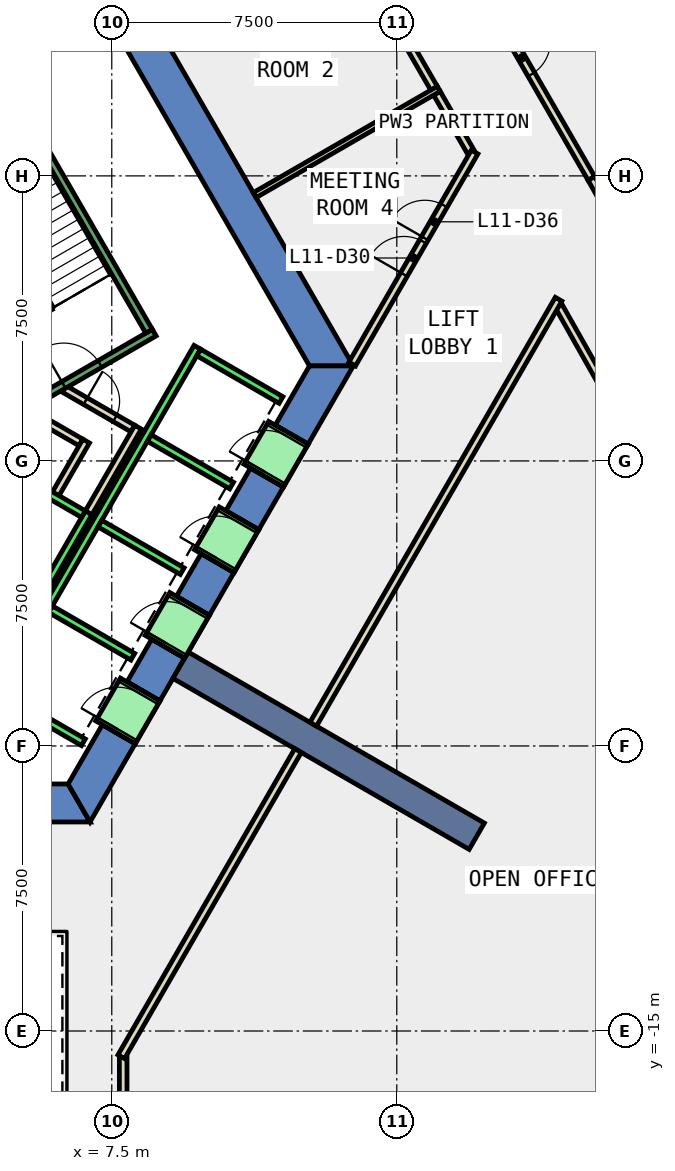
"""IFC4 building model, lengths in metres.
Left out: names, types, materials, properties, quantities, classifications, styles, units other than length and angle.
Written with IfcOpenShell. Run it as: python <this file> out.ifc"""

import sys

from ifc_helpers import new_model, si_unit, direction, frame, frame_2d, origin, place, context, subcontext, project, spatial, polyline, rectangle, outline, extrude, element, fill, save


model = new_model("IFC4")
c1 = context("Model", 3, precision=1e-05, world=origin(), true_north=direction((0.0, 1.0)))
c2 = subcontext(c1, "Body", "Model", "MODEL_VIEW")
j1 = project(units=[si_unit("LENGTHUNIT", "METRE"), si_unit("PLANEANGLEUNIT", "RADIAN")], contexts=[c1])
p1 = place(None, origin())
s1 = spatial("IfcSite", under=j1, at=p1, CompositionType="ELEMENT")
p2 = place(p1, origin())
s2 = spatial("IfcBuilding", under=s1, at=p2, CompositionType="ELEMENT")
p3 = place(p2, frame((0.0, 0.0, 56.0)))
s3 = spatial("IfcBuildingStorey", under=s2, at=p3, CompositionType="ELEMENT", Elevation=56.0)
p4 = place(p3, frame((0.0, 0.0, -0.4)))
e1 = element("IfcWall", 1, at=p4, inside=s3, PredefinedType="SHEAR", context=c2, shape_type="SweptSolid", body=[
    extrude(outline(polyline([(8.517, 11.748), (7.651, 11.248), (12.702, 2.5), (13.856, 2.5), (8.517, 11.748)])), origin(), (0.0, 0.0, 1.0), 4.2),
])
p5 = place(p3, frame((0.0, 0.0, -0.4)))
e2 = element("IfcWall", 2, at=p5, inside=s3, PredefinedType="SHEAR", context=c2, shape_type="SweptSolid", body=[
    extrude(outline(polyline([(5.75, -8.5), (5.75, -9.5), (6.928, -9.5), (6.351, -8.5), (5.75, -8.5)])), origin(), (0.0, 0.0, 1.0), 4.2),
])
p6 = place(p3, frame((0.0, 0.0, -0.4)))
e3 = element("IfcWall", 3, at=p6, inside=s3, PredefinedType="SHEAR", context=c2, shape_type="SweptSolid", body=[
    extrude(outline(polyline([(8.117, -7.44), (7.252, -6.94), (6.351, -8.5), (6.928, -9.5), (8.117, -7.44)])), origin(), (0.0, 0.0, 1.0), 4.2),
])
p7 = place(p3, frame((0.0, 0.0, -0.4)))
e4 = element("IfcWall", 4, at=p7, inside=s3, PredefinedType="SHEAR", context=c2, shape_type="SweptSolid", body=[
    extrude(outline(polyline([(9.417, -5.189), (8.551, -4.689), (7.902, -5.814), (8.767, -6.314), (9.417, -5.189)])), origin(), (0.0, 0.0, 1.0), 4.2),
])
p8 = place(p3, frame((0.0, 0.0, -0.4)))
e5 = element("IfcWall", 5, at=p8, inside=s3, PredefinedType="SHEAR", context=c2, shape_type="SweptSolid", body=[
    extrude(outline(polyline([(10.717, -2.937), (9.851, -2.437), (9.201, -3.563), (10.067, -4.063), (10.717, -2.937)])), origin(), (0.0, 0.0, 1.0), 4.2),
])
p9 = place(p3, frame((0.0, 0.0, -0.4)))
e6 = element("IfcWall", 6, at=p9, inside=s3, PredefinedType="SHEAR", context=c2, shape_type="SweptSolid", body=[
    extrude(outline(polyline([(12.017, -0.686), (11.151, -0.186), (10.501, -1.311), (11.367, -1.811), (12.017, -0.686)])), origin(), (0.0, 0.0, 1.0), 4.2),
])
p10 = place(p3, frame((0.0, 0.0, -0.4)))
e7 = element("IfcWall", 7, at=p10, inside=s3, PredefinedType="SHEAR", context=c2, shape_type="SweptSolid", body=[
    extrude(outline(polyline([(11.801, 0.94), (12.667, 0.44), (13.856, 2.5), (12.702, 2.5), (11.801, 0.94)])), origin(), (0.0, 0.0, 1.0), 4.2),
])
p11 = place(p3, frame((0.0, 0.0, 3.6)))
e8 = element("IfcWall", 8, at=p11, inside=s3, PredefinedType="SHEAR", context=c2, shape_type="SweptSolid", body=[
    extrude(outline(polyline([(8.767, -6.314), (7.902, -5.814), (7.252, -6.94), (8.117, -7.44), (8.767, -6.314)])), origin(), (0.0, 0.0, 1.0), 0.2),
])
p12 = place(p3, frame((0.0, 0.0, 3.6)))
e9 = element("IfcWall", 9, at=p12, inside=s3, PredefinedType="SHEAR", context=c2, shape_type="SweptSolid", body=[
    extrude(outline(polyline([(10.067, -4.063), (9.201, -3.563), (8.551, -4.689), (9.417, -5.189), (10.067, -4.063)])), origin(), (0.0, 0.0, 1.0), 0.2),
])
p13 = place(p3, frame((0.0, 0.0, 3.6)))
e10 = element("IfcWall", 10, at=p13, inside=s3, PredefinedType="SHEAR", context=c2, shape_type="SweptSolid", body=[
    extrude(outline(polyline([(11.367, -1.811), (10.501, -1.311), (9.851, -2.437), (10.717, -2.937), (11.367, -1.811)])), origin(), (0.0, 0.0, 1.0), 0.2),
])
p14 = place(p3, frame((0.0, 0.0, 3.6)))
e11 = element("IfcWall", 11, at=p14, inside=s3, PredefinedType="SHEAR", context=c2, shape_type="SweptSolid", body=[
    extrude(outline(polyline([(12.667, 0.44), (11.801, 0.94), (11.151, -0.186), (12.017, -0.686), (12.667, 0.44)])), origin(), (0.0, 0.0, 1.0), 0.2),
])
p15 = place(p3, frame((9.31, -5.375, -0.4), z_axis=(0.0, 0.0, 1.0), x_axis=(0.866017533419, -0.500013631625, 0.0)))
e12 = element("IfcWall", 12, at=p15, inside=s3, PredefinedType="SHEAR", context=c2, shape_type="SweptSolid", body=[
    extrude(rectangle(XDim=9.0, YDim=0.8, at=frame_2d((4.5, 0.0))), origin(), (0.0, 0.0, 1.0), 4.2),
])
p16 = place(p3, frame((15.98, 9.805, 0.0), z_axis=(0.0, 0.0, 1.0), x_axis=(-0.500150684419, 0.865938388614, 0.0)))
e13 = element("IfcWall", 13, at=p16, inside=s3, PredefinedType="PARTITIONING", context=c2, shape_type="SweptSolid", body=[
    extrude(rectangle(XDim=3.109, YDim=0.2, at=frame_2d((1.554, 0.0))), origin(), (0.0, 0.0, 1.0), 3.8),
])
p17 = place(p3, frame((16.948, 8.128, 0.0), z_axis=(0.0, 0.0, 1.0), x_axis=(-0.499931460552, 0.866064971437, 0.0)))
e14 = element("IfcWall", 14, at=p17, inside=s3, PredefinedType="PARTITIONING", context=c2, shape_type="SweptSolid", body=[
    extrude(rectangle(XDim=1.786, YDim=0.2, at=frame_2d((0.893, 0.0))), origin(), (0.0, 0.0, 1.0), 3.8),
])
p18 = place(p3, frame((21.585, -0.045, 0.0), z_axis=(0.0, 0.0, 1.0), x_axis=(-0.491542684896, 0.870853483042, 0.0)))
e15 = element("IfcWall", 15, at=p18, inside=s3, PredefinedType="PARTITIONING", context=c2, shape_type="SweptSolid", body=[
    extrude(rectangle(XDim=4.738, YDim=0.2, at=frame_2d((2.369, 0.0))), origin(), (0.0, 0.0, 1.0), 3.8),
])
p19 = place(p3, frame((16.46, 13.772, 0.0), z_axis=(0.0, 0.0, 1.0), x_axis=(0.500099745063, -0.865967808286, 0.0)))
e16 = element("IfcWall", 16, at=p19, inside=s3, PredefinedType="PARTITIONING", context=c2, shape_type="SweptSolid", body=[
    extrude(rectangle(XDim=7.319, YDim=0.2, at=frame_2d((3.659, 0.0))), origin(), (0.0, 0.0, 1.0), 3.8),
])
p20 = place(p19, frame((3.159, 0.0, 0.0)))
e17 = element("IfcOpeningElement", 17, at=p20, cuts=e16, PredefinedType="OPENING", context=c2, shape_type="SweptSolid", body=[
    extrude(rectangle(XDim=1.0, YDim=2.1, at=frame_2d((0.5, 1.05))), frame((0.0, 0.11, 0.0), z_axis=(0.0, -1.0, 0.0), x_axis=(1.0, 0.0, 0.0)), (0.0, 0.0, 1.0), 0.22),
])
p21 = place(p3, frame((20.12, 7.434, 0.0), z_axis=(0.0, 0.0, 1.0), x_axis=(0.491394823876, -0.87093692485, 0.0)))
e18 = element("IfcWall", 18, at=p21, inside=s3, PredefinedType="PARTITIONING", context=c2, shape_type="SweptSolid", body=[
    extrude(rectangle(XDim=3.547, YDim=0.2, at=frame_2d((1.773, 0.0))), origin(), (0.0, 0.0, 1.0), 3.8),
])
p22 = place(p3, frame((5.499, 1.172, 0.0), z_axis=(0.0, 0.0, 1.0), x_axis=(0.866333505267, -0.499465972466, 0.0)))
e19 = element("IfcWall", 19, at=p22, inside=s3, PredefinedType="PARTITIONING", context=c2, shape_type="SweptSolid", body=[
    extrude(rectangle(XDim=1.374, YDim=0.2, at=frame_2d((0.687, 0.0))), origin(), (0.0, 0.0, 1.0), 3.8),
])
p23 = place(p3, frame((6.826, 0.522, 0.0), z_axis=(0.0, 0.0, 1.0), x_axis=(-0.500016722714, -0.866015748706, 0.0)))
e20 = element("IfcWall", 20, at=p23, inside=s3, PredefinedType="PARTITIONING", context=c2, shape_type="SweptSolid", body=[
    extrude(rectangle(XDim=1.7, YDim=0.2, at=frame_2d((0.85, 0.0))), origin(), (0.0, 0.0, 1.0), 3.8),
])
p24 = place(p3, frame((6.25, 1.894, 0.0), z_axis=(0.0, 0.0, 1.0), x_axis=(0.866043184279, -0.499969202016, 0.0)))
e21 = element("IfcWall", 21, at=p24, inside=s3, PredefinedType="PARTITIONING", context=c2, shape_type="SweptSolid", body=[
    extrude(rectangle(XDim=2.084, YDim=0.2, at=frame_2d((1.042, 0.0))), origin(), (0.0, 0.0, 1.0), 3.8),
])
p25 = place(p24, frame((0.642, 0.0, 0.0)))
e22 = element("IfcOpeningElement", 22, at=p25, cuts=e21, PredefinedType="OPENING", context=c2, shape_type="SweptSolid", body=[
    extrude(rectangle(XDim=0.9, YDim=2.1, at=frame_2d((0.45, 1.05))), frame((0.0, 0.11, 0.0), z_axis=(0.0, -1.0, 0.0), x_axis=(1.0, 0.0, 0.0)), (0.0, 0.0, 1.0), 0.22),
])
p26 = place(p3, frame((8.192, 0.888, 0.0), z_axis=(0.0, 0.0, 1.0), x_axis=(-0.499940625693, -0.866059680843, 0.0)))
e23 = element("IfcWall", 23, at=p26, inside=s3, PredefinedType="PARTITIONING", context=c2, shape_type="SweptSolid", body=[
    extrude(rectangle(XDim=2.68, YDim=0.2, at=frame_2d((1.34, 0.0))), origin(), (0.0, 0.0, 1.0), 3.8),
])
p27 = place(p3, frame((16.104, 9.79, 0.0), z_axis=(0.0, 0.0, 1.0), x_axis=(-0.866023462144, -0.500003363005, 0.0)))
e24 = element("IfcWall", 24, at=p27, inside=s3, PredefinedType="PARTITIONING", context=c2, shape_type="SweptSolid", body=[
    extrude(rectangle(XDim=5.592, YDim=0.15, at=frame_2d((2.796, 0.0))), origin(), (0.0, 0.0, 1.0), 3.8),
])
p28 = place(p3, frame((13.827, 2.55, 0.0), z_axis=(0.0, 0.0, 1.0), x_axis=(0.500093193185, 0.865971591988, 0.0)))
e25 = element("IfcWall", 25, at=p28, inside=s3, PredefinedType="PARTITIONING", context=c2, shape_type="SweptSolid", body=[
    extrude(rectangle(XDim=6.441, YDim=0.2, at=frame_2d((3.221, 0.0))), origin(), (0.0, 0.0, 1.0), 3.8),
])
p29 = place(p28, frame((2.721, 0.0, 0.0)))
e26 = element("IfcOpeningElement", 26, at=p29, cuts=e25, PredefinedType="OPENING", context=c2, shape_type="SweptSolid", body=[
    extrude(rectangle(XDim=1.0, YDim=2.1, at=frame_2d((0.5, 1.05))), frame((0.0, 0.11, 0.0), z_axis=(0.0, -1.0, 0.0), x_axis=(1.0, 0.0, 0.0)), (0.0, 0.0, 1.0), 0.22),
])
p30 = place(p28, frame((3.821, 0.0, 0.0)))
e27 = element("IfcOpeningElement", 27, at=p30, cuts=e25, PredefinedType="OPENING", context=c2, shape_type="SweptSolid", body=[
    extrude(rectangle(XDim=1.0, YDim=2.1, at=frame_2d((0.5, 1.05))), frame((0.0, 0.11, 0.0), z_axis=(0.0, -1.0, 0.0), x_axis=(1.0, 0.0, 0.0)), (0.0, 0.0, 1.0), 0.22),
])
p31 = place(p3, frame((7.8, -15.69, 0.0), z_axis=(0.0, 0.0, 1.0), x_axis=(0.0, -1.0, 0.0)))
e28 = element("IfcWall", 28, at=p31, inside=s3, PredefinedType="PARTITIONING", context=c2, shape_type="SweptSolid", body=[
    extrude(rectangle(XDim=2.919, YDim=0.2, at=frame_2d((1.459, 0.0))), origin(), (0.0, 0.0, 1.0), 3.8),
])
p32 = place(p3, frame((19.257, 4.255, 0.0), z_axis=(0.0, 0.0, 1.0), x_axis=(-0.499978317034, -0.866037922089, 0.0)))
e29 = element("IfcWall", 29, at=p32, inside=s3, PredefinedType="PARTITIONING", context=c2, shape_type="SweptSolid", body=[
    extrude(rectangle(XDim=12.913, YDim=0.2, at=frame_2d((6.456, 0.0))), origin(), (0.0, 0.0, 1.0), 3.8),
])
p33 = place(p3, frame((12.401, -7.621, 0.0), z_axis=(0.0, 0.0, 1.0), x_axis=(-0.499983724212, -0.866034800411, 0.0)))
e30 = element("IfcWall", 30, at=p33, inside=s3, PredefinedType="PARTITIONING", context=c2, shape_type="SweptSolid", body=[
    extrude(rectangle(XDim=9.302, YDim=0.2, at=frame_2d((4.651, 0.0))), origin(), (0.0, 0.0, 1.0), 3.8),
])
p34 = place(p3, frame((5.492, -3.788, 0.0), z_axis=(0.0, 0.0, 1.0), x_axis=(0.500011755427, 0.866018616679, 0.0)))
e31 = element("IfcWall", 31, at=p34, inside=s3, PredefinedType="STANDARD", context=c2, shape_type="SweptSolid", body=[
    extrude(rectangle(XDim=2.8, YDim=0.2, at=frame_2d((1.4, 0.0))), origin(), (0.0, 0.0, 1.0), 3.8),
])
p35 = place(p3, frame((4.677, -0.2, 0.0), z_axis=(0.0, 0.0, 1.0), x_axis=(0.865973769406, -0.500089422704, 0.0)))
e32 = element("IfcWall", 32, at=p35, inside=s3, PredefinedType="STANDARD", context=c2, shape_type="SweptSolid", body=[
    extrude(rectangle(XDim=2.399, YDim=0.2, at=frame_2d((1.2, 0.0))), origin(), (0.0, 0.0, 1.0), 3.8),
])
p36 = place(p3, frame((4.451, -6.19, 0.0), z_axis=(0.0, 0.0, 1.0), x_axis=(0.50000090737, 0.866024879913, 0.0)))
e33 = element("IfcWall", 33, at=p36, inside=s3, PredefinedType="STANDARD", context=c2, shape_type="SweptSolid", body=[
    extrude(rectangle(XDim=10.6, YDim=0.2, at=frame_2d((5.3, 0.0))), origin(), (0.0, 0.0, 1.0), 3.8),
])
for number, where, z_axis, x_axis in (
    (34, (4.588, -6.153, 0.0), (0.0, 0.0, 1.0), (0.866, -0.5, 0.0)),
    (35, (5.888, -3.902, 0.0), (0.0, 0.0, 1.0), (0.866, -0.5, 0.0)),
    (36, (7.188, -1.65, 0.0), (0.0, 0.0, 1.0), (0.866, -0.5, 0.0)),
    (37, (8.488, 0.602, 0.0), (0.0, 0.0, 1.0), (0.866, -0.5, 0.0)),
):
    element("IfcWall", number, at=place(p3, frame(where, z_axis=z_axis, x_axis=x_axis)), inside=s3, PredefinedType="STANDARD", context=c2, shape_type="SweptSolid", body=[
        extrude(rectangle(XDim=2.5, YDim=0.2, at=frame_2d((1.25, 0.0))), origin(), (0.0, 0.0, 1.0), 3.8),
    ])
p37 = place(p3, frame((9.788, 2.853, 0.0), z_axis=(0.0, 0.0, 1.0), x_axis=(0.865998541277, -0.500046524342, 0.0)))
e38 = element("IfcWall", 38, at=p37, inside=s3, PredefinedType="STANDARD", context=c2, shape_type="SweptSolid", body=[
    extrude(rectangle(XDim=2.5, YDim=0.2, at=frame_2d((1.25, 0.0))), origin(), (0.0, 0.0, 1.0), 3.8),
])
p38 = place(p3, frame((7.598, -7.14, 0.0), z_axis=(0.0, 0.0, 1.0), x_axis=(0.500362116554, 0.865816234728, 0.0)))
e39 = element("IfcWall", 39, at=p38, inside=s3, PredefinedType="STANDARD", context=c2, shape_type="SweptSolid", body=[
    extrude(rectangle(XDim=1.299, YDim=1.2, at=frame_2d((0.65, 0.0))), origin(), (0.0, 0.0, 1.0), 2.4),
])
p39 = place(p38, frame((0.1, 0.0, 0.0)))
e40 = element("IfcOpeningElement", 40, at=p39, cuts=e39, PredefinedType="OPENING", context=c2, shape_type="SweptSolid", body=[
    extrude(rectangle(XDim=1.1, YDim=2.3, at=frame_2d((0.55, 1.15))), frame((0.0, 0.61, 0.0), z_axis=(0.0, -1.0, 0.0), x_axis=(1.0, 0.0, 0.0)), (0.0, 0.0, 1.0), 1.22),
])
p40 = place(p3, frame((8.898, -4.889, 0.0), z_axis=(0.0, 0.0, 1.0), x_axis=(0.500036693733, 0.866004217611, 0.0)))
e41 = element("IfcWall", 41, at=p40, inside=s3, PredefinedType="STANDARD", context=c2, shape_type="SweptSolid", body=[
    extrude(rectangle(XDim=1.3, YDim=1.2, at=frame_2d((0.65, 0.0))), origin(), (0.0, 0.0, 1.0), 2.4),
])
p41 = place(p40, frame((0.1, 0.0, 0.0)))
e42 = element("IfcOpeningElement", 42, at=p41, cuts=e41, PredefinedType="OPENING", context=c2, shape_type="SweptSolid", body=[
    extrude(rectangle(XDim=1.1, YDim=2.3, at=frame_2d((0.55, 1.15))), frame((0.0, 0.61, 0.0), z_axis=(0.0, -1.0, 0.0), x_axis=(1.0, 0.0, 0.0)), (0.0, 0.0, 1.0), 1.22),
])
p42 = place(p3, frame((10.198, -2.637, 0.0), z_axis=(0.0, 0.0, 1.0), x_axis=(0.49989585183, 0.866085525409, 0.0)))
e43 = element("IfcWall", 43, at=p42, inside=s3, PredefinedType="STANDARD", context=c2, shape_type="SweptSolid", body=[
    extrude(rectangle(XDim=1.3, YDim=1.2, at=frame_2d((0.65, 0.0))), origin(), (0.0, 0.0, 1.0), 2.4),
])
p43 = place(p42, frame((0.1, 0.0, 0.0)))
e44 = element("IfcOpeningElement", 44, at=p43, cuts=e43, PredefinedType="OPENING", context=c2, shape_type="SweptSolid", body=[
    extrude(rectangle(XDim=1.1, YDim=2.3, at=frame_2d((0.55, 1.15))), frame((0.0, 0.61, 0.0), z_axis=(0.0, -1.0, 0.0), x_axis=(1.0, 0.0, 0.0)), (0.0, 0.0, 1.0), 1.22),
])
p44 = place(p3, frame((11.498, -0.385, 0.0), z_axis=(0.0, 0.0, 1.0), x_axis=(0.500221244143, 0.865897630733, 0.0)))
e45 = element("IfcWall", 45, at=p44, inside=s3, PredefinedType="STANDARD", context=c2, shape_type="SweptSolid", body=[
    extrude(rectangle(XDim=1.299, YDim=1.2, at=frame_2d((0.65, 0.0))), origin(), (0.0, 0.0, 1.0), 2.4),
])
p45 = place(p44, frame((0.1, 0.0, 0.0)))
e46 = element("IfcOpeningElement", 46, at=p45, cuts=e45, PredefinedType="OPENING", context=c2, shape_type="SweptSolid", body=[
    extrude(rectangle(XDim=1.1, YDim=2.3, at=frame_2d((0.55, 1.15))), frame((0.0, 0.61, 0.0), z_axis=(0.0, -1.0, 0.0), x_axis=(1.0, 0.0, 0.0)), (0.0, 0.0, 1.0), 1.22),
])
p46 = place(p3, frame((4.806, 1.176, 0.0), z_axis=(0.0, 0.0, 1.0), x_axis=(0.866059941101, 0.499940174841, 0.0)))
e47 = element("IfcWall", 47, at=p46, inside=s3, PredefinedType="STANDARD", context=c2, shape_type="SweptSolid", body=[
    extrude(rectangle(XDim=4.4, YDim=0.2, at=frame_2d((2.2, 0.0))), origin(), (0.0, 0.0, 1.0), 3.8),
])
p47 = place(p46, frame((1.65, 0.0, 0.0)))
e48 = element("IfcOpeningElement", 48, at=p47, cuts=e47, PredefinedType="OPENING", context=c2, shape_type="SweptSolid", body=[
    extrude(rectangle(XDim=1.1, YDim=2.2, at=frame_2d((0.55, 1.1))), frame((0.0, 0.11, 0.0), z_axis=(0.0, -1.0, 0.0), x_axis=(1.0, 0.0, 0.0)), (0.0, 0.0, 1.0), 0.22),
])
p48 = place(p3, frame((8.48, 3.412, 0.0), z_axis=(0.0, 0.0, 1.0), x_axis=(-0.499978703459, 0.866037698999, 0.0)))
e49 = element("IfcWall", 49, at=p48, inside=s3, PredefinedType="STANDARD", context=c2, shape_type="SweptSolid", body=[
    extrude(rectangle(XDim=6.9, YDim=0.2, at=frame_2d((3.45, 0.0))), origin(), (0.0, 0.0, 1.0), 3.8),
])
p49 = place(p20, origin())
e50 = element("IfcDoor", 50, at=p49, inside=s3, OperationType="SINGLE_SWING_LEFT", PredefinedType="DOOR", context=c2, shape_type="SweptSolid", body=[
    extrude(rectangle(XDim=1.0, YDim=2.1, at=frame_2d((0.5, 1.05))), frame((0.0, 0.025, 0.0), z_axis=(0.0, -1.0, 0.0), x_axis=(1.0, 0.0, 0.0)), (0.0, 0.0, 1.0), 0.05),
])
fill(e17, e50)
p50 = place(p29, origin())
e51 = element("IfcDoor", 51, at=p50, inside=s3, OperationType="SINGLE_SWING_LEFT", PredefinedType="DOOR", context=c2, shape_type="SweptSolid", body=[
    extrude(rectangle(XDim=1.0, YDim=2.1, at=frame_2d((0.5, 1.05))), frame((0.0, 0.025, 0.0), z_axis=(0.0, -1.0, 0.0), x_axis=(1.0, 0.0, 0.0)), (0.0, 0.0, 1.0), 0.05),
])
fill(e26, e51)
p51 = place(p25, origin())
e52 = element("IfcDoor", 52, at=p51, inside=s3, OperationType="SINGLE_SWING_LEFT", PredefinedType="DOOR", context=c2, shape_type="SweptSolid", body=[
    extrude(rectangle(XDim=0.9, YDim=2.1, at=frame_2d((0.45, 1.05))), frame((0.0, 0.025, 0.0), z_axis=(0.0, -1.0, 0.0), x_axis=(1.0, 0.0, 0.0)), (0.0, 0.0, 1.0), 0.05),
])
fill(e22, e52)
p52 = place(p30, origin())
e53 = element("IfcDoor", 53, at=p52, inside=s3, OperationType="SINGLE_SWING_RIGHT", PredefinedType="DOOR", context=c2, shape_type="SweptSolid", body=[
    extrude(rectangle(XDim=1.0, YDim=2.1, at=frame_2d((0.5, 1.05))), frame((0.0, 0.025, 0.0), z_axis=(0.0, -1.0, 0.0), x_axis=(1.0, 0.0, 0.0)), (0.0, 0.0, 1.0), 0.05),
])
fill(e27, e53)
p53 = place(p39, origin())
e54 = element("IfcDoor", 54, at=p53, inside=s3, OperationType="SLIDING_TO_LEFT", PredefinedType="DOOR", context=c2, shape_type="SweptSolid", body=[
    extrude(rectangle(XDim=1.1, YDim=2.3, at=frame_2d((0.55, 1.15))), frame((0.0, 0.025, 0.0), z_axis=(0.0, -1.0, 0.0), x_axis=(1.0, 0.0, 0.0)), (0.0, 0.0, 1.0), 0.05),
])
fill(e40, e54)
p54 = place(p41, origin())
e55 = element("IfcDoor", 55, at=p54, inside=s3, OperationType="SLIDING_TO_LEFT", PredefinedType="DOOR", context=c2, shape_type="SweptSolid", body=[
    extrude(rectangle(XDim=1.1, YDim=2.3, at=frame_2d((0.55, 1.15))), frame((0.0, 0.025, 0.0), z_axis=(0.0, -1.0, 0.0), x_axis=(1.0, 0.0, 0.0)), (0.0, 0.0, 1.0), 0.05),
])
fill(e42, e55)
p55 = place(p43, origin())
e56 = element("IfcDoor", 56, at=p55, inside=s3, OperationType="SLIDING_TO_LEFT", PredefinedType="DOOR", context=c2, shape_type="SweptSolid", body=[
    extrude(rectangle(XDim=1.1, YDim=2.3, at=frame_2d((0.55, 1.15))), frame((0.0, 0.025, 0.0), z_axis=(0.0, -1.0, 0.0), x_axis=(1.0, 0.0, 0.0)), (0.0, 0.0, 1.0), 0.05),
])
fill(e44, e56)
p56 = place(p45, origin())
e57 = element("IfcDoor", 57, at=p56, inside=s3, OperationType="SLIDING_TO_LEFT", PredefinedType="DOOR", context=c2, shape_type="SweptSolid", body=[
    extrude(rectangle(XDim=1.1, YDim=2.3, at=frame_2d((0.55, 1.15))), frame((0.0, 0.025, 0.0), z_axis=(0.0, -1.0, 0.0), x_axis=(1.0, 0.0, 0.0)), (0.0, 0.0, 1.0), 0.05),
])
fill(e46, e57)
p57 = place(p47, origin())
e58 = element("IfcDoor", 58, at=p57, inside=s3, OperationType="SINGLE_SWING_LEFT", PredefinedType="DOOR", context=c2, shape_type="SweptSolid", body=[
    extrude(rectangle(XDim=1.1, YDim=2.2, at=frame_2d((0.55, 1.1))), frame((0.0, 0.025, 0.0), z_axis=(0.0, -1.0, 0.0), x_axis=(1.0, 0.0, 0.0)), (0.0, 0.0, 1.0), 0.05),
])
fill(e48, e58)
save(model, sys.argv[1])
